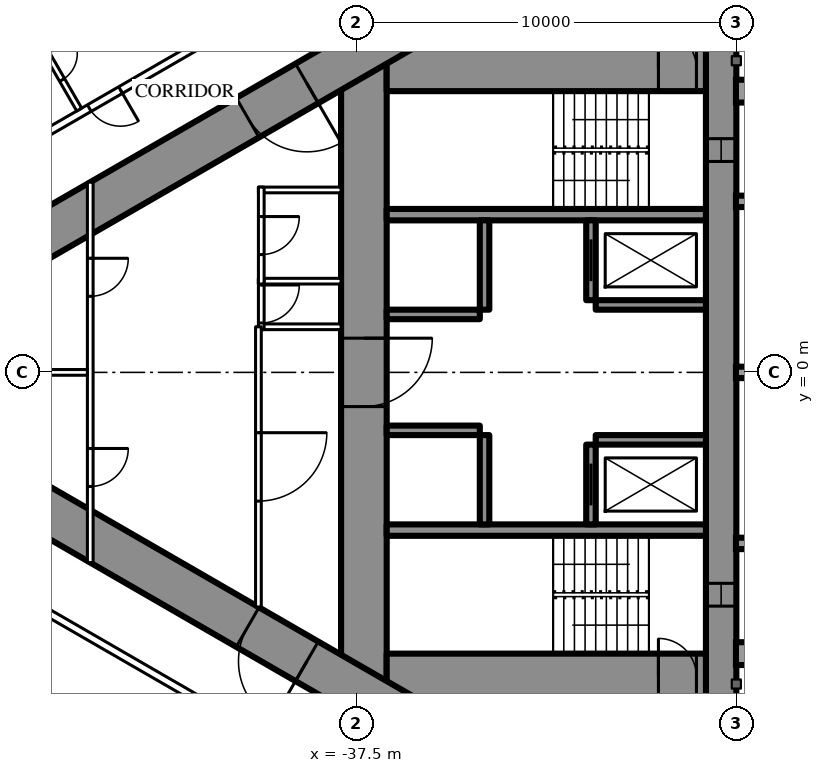
"""IFC4 building model, lengths in metres.
Left out: names, types, materials, properties, quantities, classifications, styles, units other than length and angle.
Written with IfcOpenShell. Run it as: python <this file> out.ifc"""

import sys

from ifc_helpers import new_model, si_unit, direction, frame, frame_2d, origin, place, context, subcontext, project, spatial, rectangle, extrude, element, fill, save


model = new_model("IFC4")
c1 = context("Model", 3, precision=1e-05, world=origin(), true_north=direction((0.0, 1.0)))
c2 = subcontext(c1, "Body", "Model", "MODEL_VIEW")
j1 = project(units=[si_unit("LENGTHUNIT", "METRE"), si_unit("PLANEANGLEUNIT", "RADIAN")], contexts=[c1])
p1 = place(None, origin())
s1 = spatial("IfcSite", under=j1, at=p1, CompositionType="ELEMENT")
p2 = place(p1, origin())
s2 = spatial("IfcBuilding", under=s1, at=p2, CompositionType="ELEMENT")
p3 = place(p2, frame((0.0, 0.0, 125.6)))
s3 = spatial("IfcBuildingStorey", under=s2, at=p3, CompositionType="ELEMENT", Elevation=125.6)
p4 = place(p3, frame((-27.9, 8.6, 0.0), z_axis=(0.0, 0.0, 1.0), x_axis=(0.0, -1.0, 0.0)))
e1 = element("IfcWall", 1, at=p4, inside=s3, PredefinedType="SHEAR", context=c2, shape_type="SweptSolid", body=[
    extrude(rectangle(XDim=17.2, YDim=0.8, at=frame_2d((8.6, 0.0))), origin(), (0.0, 0.0, 1.0), 3.5),
])
p5 = place(p4, frame((2.45, 0.0, 0.6)))
e2 = element("IfcOpeningElement", 2, at=p5, cuts=e1, PredefinedType="OPENING", context=c2, shape_type="SweptSolid", body=[
    extrude(rectangle(XDim=0.6, YDim=2.1, at=frame_2d((0.3, 1.05))), frame((0.0, 0.41, 0.0), z_axis=(0.0, -1.0, 0.0), x_axis=(1.0, 0.0, 0.0)), (0.0, 0.0, 1.0), 0.82),
])
p6 = place(p4, frame((14.15, 0.0, 0.6)))
e3 = element("IfcOpeningElement", 3, at=p6, cuts=e1, PredefinedType="OPENING", context=c2, shape_type="SweptSolid", body=[
    extrude(rectangle(XDim=0.6, YDim=2.1, at=frame_2d((0.3, 1.05))), frame((0.0, 0.41, 0.0), z_axis=(0.0, -1.0, 0.0), x_axis=(1.0, 0.0, 0.0)), (0.0, 0.0, 1.0), 0.82),
])
p7 = place(p3, frame((-37.3, 8.6, 0.0), z_axis=(0.0, 0.0, 1.0), x_axis=(0.0, -1.0, 0.0)))
e4 = element("IfcWall", 4, at=p7, inside=s3, PredefinedType="SHEAR", context=c2, shape_type="SweptSolid", body=[
    extrude(rectangle(XDim=17.2, YDim=1.2, at=frame_2d((8.6, 0.0))), origin(), (0.0, 0.0, 1.0), 3.5),
])
p8 = place(p7, frame((7.7, 0.0, 0.0)))
e5 = element("IfcOpeningElement", 5, at=p8, cuts=e4, PredefinedType="OPENING", context=c2, shape_type="SweptSolid", body=[
    extrude(rectangle(XDim=1.8, YDim=2.2, at=frame_2d((0.9, 1.1))), frame((0.0, 0.61, 0.0), z_axis=(0.0, -1.0, 0.0), x_axis=(1.0, 0.0, 0.0)), (0.0, 0.0, 1.0), 1.22),
])
p9 = place(p3, frame((-28.3, 8.0, 0.0), z_axis=(0.0, 0.0, 1.0), x_axis=(-1.0, 0.0, 0.0)))
e6 = element("IfcWall", 6, at=p9, inside=s3, PredefinedType="SHEAR", context=c2, shape_type="SweptSolid", body=[
    extrude(rectangle(XDim=8.4, YDim=1.2, at=frame_2d((4.2, 0.0))), origin(), (0.0, 0.0, 1.0), 3.5),
])
p10 = place(p9, frame((0.25, 0.0, 0.0)))
e7 = element("IfcOpeningElement", 7, at=p10, cuts=e6, PredefinedType="OPENING", context=c2, shape_type="SweptSolid", body=[
    extrude(rectangle(XDim=1.0, YDim=2.2, at=frame_2d((0.5, 1.1))), frame((0.0, 0.61, 0.0), z_axis=(0.0, -1.0, 0.0), x_axis=(1.0, 0.0, 0.0)), (0.0, 0.0, 1.0), 1.22),
])
p11 = place(p3, frame((-28.3, -8.0, 0.0), z_axis=(0.0, 0.0, 1.0), x_axis=(-1.0, 0.0, 0.0)))
e8 = element("IfcWall", 8, at=p11, inside=s3, PredefinedType="SHEAR", context=c2, shape_type="SweptSolid", body=[
    extrude(rectangle(XDim=8.4, YDim=1.2, at=frame_2d((4.2, 0.0))), origin(), (0.0, 0.0, 1.0), 3.5),
])
p12 = place(p11, frame((0.25, 0.0, 0.0)))
e9 = element("IfcOpeningElement", 9, at=p12, cuts=e8, PredefinedType="OPENING", context=c2, shape_type="SweptSolid", body=[
    extrude(rectangle(XDim=1.0, YDim=2.2, at=frame_2d((0.5, 1.1))), frame((0.0, 0.61, 0.0), z_axis=(0.0, -1.0, 0.0), x_axis=(1.0, 0.0, 0.0)), (0.0, 0.0, 1.0), 1.22),
])
for number, where, z_axis, x_axis in (
    (10, (-28.3, 4.15, 0.0), (0.0, 0.0, 1.0), (-1.0, 0.0, 0.0)),
    (11, (-28.3, -4.15, 0.0), (0.0, 0.0, 1.0), (-1.0, 0.0, 0.0)),
):
    element("IfcWall", number, at=place(p3, frame(where, z_axis=z_axis, x_axis=x_axis)), inside=s3, PredefinedType="SHEAR", context=c2, shape_type="SweptSolid", body=[
        extrude(rectangle(XDim=8.4, YDim=0.3, at=frame_2d((4.2, 0.0))), origin(), (0.0, 0.0, 1.0), 3.5),
    ])
p13 = place(p3, frame((-31.325, 4.0, 0.0), z_axis=(0.0, 0.0, 1.0), x_axis=(0.0, -1.0, 0.0)))
e12 = element("IfcWall", 12, at=p13, inside=s3, PredefinedType="SHEAR", context=c2, shape_type="SweptSolid", body=[
    extrude(rectangle(XDim=2.1, YDim=0.25, at=frame_2d((1.05, 0.0))), origin(), (0.0, 0.0, 1.0), 3.5),
])
p14 = place(p13, frame((0.5, 0.0, 0.0)))
e13 = element("IfcOpeningElement", 13, at=p14, cuts=e12, PredefinedType="OPENING", context=c2, shape_type="SweptSolid", body=[
    extrude(rectangle(XDim=1.1, YDim=2.2, at=frame_2d((0.55, 1.1))), frame((0.0, 0.135, 0.0), z_axis=(0.0, -1.0, 0.0), x_axis=(1.0, 0.0, 0.0)), (0.0, 0.0, 1.0), 0.27),
])
p15 = place(p3, frame((-34.125, 4.0, 0.0), z_axis=(0.0, 0.0, 1.0), x_axis=(0.0, -1.0, 0.0)))
e14 = element("IfcWall", 14, at=p15, inside=s3, PredefinedType="SHEAR", context=c2, shape_type="SweptSolid", body=[
    extrude(rectangle(XDim=2.35, YDim=0.25, at=frame_2d((1.175, 0.0))), origin(), (0.0, 0.0, 1.0), 3.5),
])
p16 = place(p3, frame((-28.3, 1.775, 0.0), z_axis=(0.0, 0.0, 1.0), x_axis=(-1.0, 0.0, 0.0)))
e15 = element("IfcWall", 15, at=p16, inside=s3, PredefinedType="SHEAR", context=c2, shape_type="SweptSolid", body=[
    extrude(rectangle(XDim=2.9, YDim=0.25, at=frame_2d((1.45, 0.0))), origin(), (0.0, 0.0, 1.0), 3.5),
])
p17 = place(p3, frame((-34.25, 1.525, 0.0), z_axis=(0.0, 0.0, 1.0), x_axis=(-1.0, 0.0, 0.0)))
e16 = element("IfcWall", 16, at=p17, inside=s3, PredefinedType="SHEAR", context=c2, shape_type="SweptSolid", body=[
    extrude(rectangle(XDim=2.45, YDim=0.25, at=frame_2d((1.225, 0.0))), origin(), (0.0, 0.0, 1.0), 3.5),
])
p18 = place(p3, frame((-31.325, -1.9, 0.0), z_axis=(0.0, 0.0, 1.0), x_axis=(0.0, -1.0, 0.0)))
e17 = element("IfcWall", 17, at=p18, inside=s3, PredefinedType="SHEAR", context=c2, shape_type="SweptSolid", body=[
    extrude(rectangle(XDim=2.1, YDim=0.25, at=frame_2d((1.05, 0.0))), origin(), (0.0, 0.0, 1.0), 3.5),
])
p19 = place(p18, frame((0.5, 0.0, 0.0)))
e18 = element("IfcOpeningElement", 18, at=p19, cuts=e17, PredefinedType="OPENING", context=c2, shape_type="SweptSolid", body=[
    extrude(rectangle(XDim=1.1, YDim=2.2, at=frame_2d((0.55, 1.1))), frame((0.0, 0.135, 0.0), z_axis=(0.0, -1.0, 0.0), x_axis=(1.0, 0.0, 0.0)), (0.0, 0.0, 1.0), 0.27),
])
p20 = place(p3, frame((-34.125, -1.65, 0.0), z_axis=(0.0, 0.0, 1.0), x_axis=(0.0, -1.0, 0.0)))
e19 = element("IfcWall", 19, at=p20, inside=s3, PredefinedType="SHEAR", context=c2, shape_type="SweptSolid", body=[
    extrude(rectangle(XDim=2.35, YDim=0.25, at=frame_2d((1.175, 0.0))), origin(), (0.0, 0.0, 1.0), 3.5),
])
p21 = place(p3, frame((-28.3, -1.775, 0.0), z_axis=(0.0, 0.0, 1.0), x_axis=(-1.0, 0.0, 0.0)))
e20 = element("IfcWall", 20, at=p21, inside=s3, PredefinedType="SHEAR", context=c2, shape_type="SweptSolid", body=[
    extrude(rectangle(XDim=2.9, YDim=0.25, at=frame_2d((1.45, 0.0))), origin(), (0.0, 0.0, 1.0), 3.5),
])
p22 = place(p3, frame((-34.25, -1.525, 0.0), z_axis=(0.0, 0.0, 1.0), x_axis=(-1.0, 0.0, 0.0)))
e21 = element("IfcWall", 21, at=p22, inside=s3, PredefinedType="SHEAR", context=c2, shape_type="SweptSolid", body=[
    extrude(rectangle(XDim=2.45, YDim=0.25, at=frame_2d((1.225, 0.0))), origin(), (0.0, 0.0, 1.0), 3.5),
])
p23 = place(p3, frame((-27.2, 14.3, 0.0), z_axis=(0.0, 0.0, 1.0), x_axis=(-0.866026593062, -0.499997940104, 0.0)))
e22 = element("IfcWall", 22, at=p23, inside=s3, PredefinedType="SHEAR", context=c2, shape_type="SweptSolid", body=[
    extrude(rectangle(XDim=28.946, YDim=1.2, at=frame_2d((14.473, 0.0))), origin(), (0.0, 0.0, 1.0), 3.5),
])
p24 = place(p23, frame((4.6, 0.0, 0.0)))
e23 = element("IfcOpeningElement", 23, at=p24, cuts=e22, PredefinedType="OPENING", context=c2, shape_type="SweptSolid", body=[
    extrude(rectangle(XDim=1.0, YDim=2.2, at=frame_2d((0.5, 1.1))), frame((0.0, 0.61, 0.0), z_axis=(0.0, -1.0, 0.0), x_axis=(1.0, 0.0, 0.0)), (0.0, 0.0, 1.0), 1.22),
])
p25 = place(p23, frame((13.395, 0.0, 0.0)))
e24 = element("IfcOpeningElement", 24, at=p25, cuts=e22, PredefinedType="OPENING", context=c2, shape_type="SweptSolid", body=[
    extrude(rectangle(XDim=1.8, YDim=2.2, at=frame_2d((0.9, 1.1))), frame((0.0, 0.61, 0.0), z_axis=(0.0, -1.0, 0.0), x_axis=(1.0, 0.0, 0.0)), (0.0, 0.0, 1.0), 1.22),
])
p26 = place(p3, frame((-27.2, -14.3, 0.0), z_axis=(0.0, 0.0, 1.0), x_axis=(-0.866024021859, 0.500002393557, 0.0)))
e25 = element("IfcWall", 25, at=p26, inside=s3, PredefinedType="SHEAR", context=c2, shape_type="SweptSolid", body=[
    extrude(rectangle(XDim=27.907, YDim=1.2, at=frame_2d((13.954, 0.0))), origin(), (0.0, 0.0, 1.0), 3.5),
])
p27 = place(p26, frame((4.6, 0.0, 0.0)))
e26 = element("IfcOpeningElement", 26, at=p27, cuts=e25, PredefinedType="OPENING", context=c2, shape_type="SweptSolid", body=[
    extrude(rectangle(XDim=1.0, YDim=2.2, at=frame_2d((0.5, 1.1))), frame((0.0, 0.61, 0.0), z_axis=(0.0, -1.0, 0.0), x_axis=(1.0, 0.0, 0.0)), (0.0, 0.0, 1.0), 1.22),
])
p28 = place(p26, frame((13.395, 0.0, 0.0)))
e27 = element("IfcOpeningElement", 27, at=p28, cuts=e25, PredefinedType="OPENING", context=c2, shape_type="SweptSolid", body=[
    extrude(rectangle(XDim=1.8, YDim=2.2, at=frame_2d((0.9, 1.1))), frame((0.0, 0.61, 0.0), z_axis=(0.0, -1.0, 0.0), x_axis=(1.0, 0.0, 0.0)), (0.0, 0.0, 1.0), 1.22),
])
p29 = place(p3, frame((-36.92, -11.344, 0.0), z_axis=(0.0, 0.0, 1.0), x_axis=(-0.866028313256, 0.499994960614, 0.0)))
e28 = element("IfcWall", 28, at=p29, inside=s3, PredefinedType="PARTITIONING", context=c2, shape_type="SweptSolid", body=[
    extrude(rectangle(XDim=22.568, YDim=0.2, at=frame_2d((11.284, 0.0))), origin(), (0.0, 0.0, 1.0), 3.25),
])
p30 = place(p29, frame((12.131, 0.0, 0.0)))
e29 = element("IfcOpeningElement", 29, at=p30, cuts=e28, PredefinedType="OPENING", context=c2, shape_type="SweptSolid", body=[
    extrude(rectangle(XDim=0.95, YDim=2.2, at=frame_2d((0.475, 1.1))), frame((0.0, 0.11, 0.0), z_axis=(0.0, -1.0, 0.0), x_axis=(1.0, 0.0, 0.0)), (0.0, 0.0, 1.0), 0.22),
])
p31 = place(p29, frame((3.35, 0.0, 0.0)))
e30 = element("IfcOpeningElement", 30, at=p31, cuts=e28, PredefinedType="OPENING", context=c2, shape_type="SweptSolid", body=[
    extrude(rectangle(XDim=1.0, YDim=2.2, at=frame_2d((0.5, 1.1))), frame((0.0, 0.11, 0.0), z_axis=(0.0, -1.0, 0.0), x_axis=(1.0, 0.0, 0.0)), (0.0, 0.0, 1.0), 0.22),
])
p32 = place(p3, frame((-37.7, 10.894, 0.0), z_axis=(0.0, 0.0, 1.0), x_axis=(-0.866027551079, -0.499996280759, 0.0)))
e31 = element("IfcWall", 31, at=p32, inside=s3, PredefinedType="PARTITIONING", context=c2, shape_type="SweptSolid", body=[
    extrude(rectangle(XDim=10.831, YDim=0.2, at=frame_2d((5.415, 0.0))), origin(), (0.0, 0.0, 1.0), 3.25),
])
p33 = place(p32, frame((6.93, 0.0, 0.0)))
e32 = element("IfcOpeningElement", 32, at=p33, cuts=e31, PredefinedType="OPENING", context=c2, shape_type="SweptSolid", body=[
    extrude(rectangle(XDim=0.95, YDim=2.2, at=frame_2d((0.475, 1.1))), frame((0.0, 0.11, 0.0), z_axis=(0.0, -1.0, 0.0), x_axis=(1.0, 0.0, 0.0)), (0.0, 0.0, 1.0), 0.22),
])
p34 = place(p3, frame((-44.791, 6.915, 0.0), z_axis=(0.0, 0.0, 1.0), x_axis=(-0.500047596559, 0.865997922154, 0.0)))
e33 = element("IfcWall", 33, at=p34, inside=s3, PredefinedType="PARTITIONING", context=c2, shape_type="SweptSolid", body=[
    extrude(rectangle(XDim=2.6, YDim=0.15, at=frame_2d((1.3, 0.0))), origin(), (0.0, 0.0, 1.0), 3.25),
])
p35 = place(p34, frame((0.9, 0.0, 0.0)))
e34 = element("IfcOpeningElement", 34, at=p35, cuts=e33, PredefinedType="OPENING", context=c2, shape_type="SweptSolid", body=[
    extrude(rectangle(XDim=0.8, YDim=2.2, at=frame_2d((0.4, 1.1))), frame((0.0, 0.085, 0.0), z_axis=(0.0, -1.0, 0.0), x_axis=(1.0, 0.0, 0.0)), (0.0, 0.0, 1.0), 0.17),
])
for number, where, z_axis, x_axis in (
    (35, (-37.9, 1.2, 0.0), (0.0, 0.0, 1.0), (-1.0, 0.0, 0.0)),
    (36, (-37.9, 2.4, 0.0), (0.0, 0.0, 1.0), (-1.0, 0.0, 0.0)),
    (37, (-37.9, 4.8, 0.0), (0.0, 0.0, 1.0), (-1.0, 0.0, 0.0)),
):
    element("IfcWall", number, at=place(p3, frame(where, z_axis=z_axis, x_axis=x_axis)), inside=s3, PredefinedType="PARTITIONING", context=c2, shape_type="SweptSolid", body=[
        extrude(rectangle(XDim=2.175, YDim=0.15, at=frame_2d((1.087, 0.0))), origin(), (0.0, 0.0, 1.0), 3.25),
    ])
p36 = place(p3, frame((-40.0, 2.475, 0.0), z_axis=(0.0, 0.0, 1.0), x_axis=(0.0, -1.0, 0.0)))
e38 = element("IfcWall", 38, at=p36, inside=s3, PredefinedType="PARTITIONING", context=c2, shape_type="SweptSolid", body=[
    extrude(rectangle(XDim=1.35, YDim=0.15, at=frame_2d((0.675, 0.0))), origin(), (0.0, 0.0, 1.0), 3.25),
])
p37 = place(p36, frame((0.175, 0.0, 0.0)))
e39 = element("IfcOpeningElement", 39, at=p37, cuts=e38, PredefinedType="OPENING", context=c2, shape_type="SweptSolid", body=[
    extrude(rectangle(XDim=1.0, YDim=2.2, at=frame_2d((0.5, 1.1))), frame((0.0, 0.085, 0.0), z_axis=(0.0, -1.0, 0.0), x_axis=(1.0, 0.0, 0.0)), (0.0, 0.0, 1.0), 0.17),
])
p38 = place(p3, frame((-40.0, 4.875, 0.0), z_axis=(0.0, 0.0, 1.0), x_axis=(0.0, -1.0, 0.0)))
e40 = element("IfcWall", 40, at=p38, inside=s3, PredefinedType="PARTITIONING", context=c2, shape_type="SweptSolid", body=[
    extrude(rectangle(XDim=2.55, YDim=0.15, at=frame_2d((1.275, 0.0))), origin(), (0.0, 0.0, 1.0), 3.25),
])
p39 = place(p38, frame((0.775, 0.0, 0.0)))
e41 = element("IfcOpeningElement", 41, at=p39, cuts=e40, PredefinedType="OPENING", context=c2, shape_type="SweptSolid", body=[
    extrude(rectangle(XDim=1.0, YDim=2.2, at=frame_2d((0.5, 1.1))), frame((0.0, 0.085, 0.0), z_axis=(0.0, -1.0, 0.0), x_axis=(1.0, 0.0, 0.0)), (0.0, 0.0, 1.0), 0.17),
])
p40 = place(p3, frame((-40.075, 1.2, 0.0), z_axis=(0.0, 0.0, 1.0), x_axis=(0.0, -1.0, 0.0)))
e42 = element("IfcWall", 42, at=p40, inside=s3, PredefinedType="PARTITIONING", context=c2, shape_type="SweptSolid", body=[
    extrude(rectangle(XDim=7.374, YDim=0.15, at=frame_2d((3.687, 0.0))), origin(), (0.0, 0.0, 1.0), 3.25),
])
p41 = place(p40, frame((2.787, 0.0, 0.0)))
e43 = element("IfcOpeningElement", 43, at=p41, cuts=e42, PredefinedType="OPENING", context=c2, shape_type="SweptSolid", body=[
    extrude(rectangle(XDim=1.8, YDim=2.2, at=frame_2d((0.9, 1.1))), frame((0.0, 0.085, 0.0), z_axis=(0.0, -1.0, 0.0), x_axis=(1.0, 0.0, 0.0)), (0.0, 0.0, 1.0), 0.17),
])
p42 = place(p3, frame((-44.5, 5.005, 0.0), z_axis=(0.0, 0.0, 1.0), x_axis=(0.0, -1.0, 0.0)))
e44 = element("IfcWall", 44, at=p42, inside=s3, PredefinedType="PARTITIONING", context=c2, shape_type="SweptSolid", body=[
    extrude(rectangle(XDim=10.009, YDim=0.15, at=frame_2d((5.005, 0.0))), origin(), (0.0, 0.0, 1.0), 2.45),
])
p43 = place(p42, frame((2.002, 0.0, 0.0)))
e45 = element("IfcOpeningElement", 45, at=p43, cuts=e44, PredefinedType="OPENING", context=c2, shape_type="SweptSolid", body=[
    extrude(rectangle(XDim=1.0, YDim=2.2, at=frame_2d((0.5, 1.1))), frame((0.0, 0.085, 0.0), z_axis=(0.0, -1.0, 0.0), x_axis=(1.0, 0.0, 0.0)), (0.0, 0.0, 1.0), 0.17),
])
p44 = place(p42, frame((7.007, 0.0, 0.0)))
e46 = element("IfcOpeningElement", 46, at=p44, cuts=e44, PredefinedType="OPENING", context=c2, shape_type="SweptSolid", body=[
    extrude(rectangle(XDim=1.0, YDim=2.2, at=frame_2d((0.5, 1.1))), frame((0.0, 0.085, 0.0), z_axis=(0.0, -1.0, 0.0), x_axis=(1.0, 0.0, 0.0)), (0.0, 0.0, 1.0), 0.17),
])
p45 = place(p3, frame((-44.575, 0.0, 0.0), z_axis=(0.0, 0.0, 1.0), x_axis=(-1.0, 0.0, 0.0)))
e47 = element("IfcWall", 47, at=p45, inside=s3, PredefinedType="PARTITIONING", context=c2, shape_type="SweptSolid", body=[
    extrude(rectangle(XDim=8.593, YDim=0.15, at=frame_2d((4.297, 0.0))), origin(), (0.0, 0.0, 1.0), 2.2),
])
p46 = place(p35, origin())
e48 = element("IfcDoor", 48, at=p46, inside=s3, OperationType="SINGLE_SWING_RIGHT", PredefinedType="DOOR", context=c2, shape_type="SweptSolid", body=[
    extrude(rectangle(XDim=0.8, YDim=2.2, at=frame_2d((0.4, 1.1))), frame((0.0, 0.025, 0.0), z_axis=(0.0, -1.0, 0.0), x_axis=(1.0, 0.0, 0.0)), (0.0, 0.0, 1.0), 0.05),
])
fill(e34, e48)
p47 = place(p33, origin())
e49 = element("IfcDoor", 49, at=p47, inside=s3, OperationType="SINGLE_SWING_LEFT", PredefinedType="DOOR", context=c2, shape_type="SweptSolid", body=[
    extrude(rectangle(XDim=0.95, YDim=2.2, at=frame_2d((0.475, 1.1))), frame((0.0, 0.025, 0.0), z_axis=(0.0, -1.0, 0.0), x_axis=(1.0, 0.0, 0.0)), (0.0, 0.0, 1.0), 0.05),
])
fill(e32, e49)
p48 = place(p37, origin())
e50 = element("IfcDoor", 50, at=p48, inside=s3, OperationType="SINGLE_SWING_LEFT", PredefinedType="DOOR", context=c2, shape_type="SweptSolid", body=[
    extrude(rectangle(XDim=1.0, YDim=2.2, at=frame_2d((0.5, 1.1))), frame((0.0, 0.025, 0.0), z_axis=(0.0, -1.0, 0.0), x_axis=(1.0, 0.0, 0.0)), (0.0, 0.0, 1.0), 0.05),
])
fill(e39, e50)
p49 = place(p39, origin())
e51 = element("IfcDoor", 51, at=p49, inside=s3, OperationType="SINGLE_SWING_LEFT", PredefinedType="DOOR", context=c2, shape_type="SweptSolid", body=[
    extrude(rectangle(XDim=1.0, YDim=2.2, at=frame_2d((0.5, 1.1))), frame((0.0, 0.025, 0.0), z_axis=(0.0, -1.0, 0.0), x_axis=(1.0, 0.0, 0.0)), (0.0, 0.0, 1.0), 0.05),
])
fill(e41, e51)
p50 = place(p41, origin())
e52 = element("IfcDoor", 52, at=p50, inside=s3, OperationType="DOUBLE_DOOR_SINGLE_SWING", PredefinedType="DOOR", context=c2, shape_type="SweptSolid", body=[
    extrude(rectangle(XDim=1.8, YDim=2.2, at=frame_2d((0.9, 1.1))), frame((0.0, 0.025, 0.0), z_axis=(0.0, -1.0, 0.0), x_axis=(1.0, 0.0, 0.0)), (0.0, 0.0, 1.0), 0.05),
])
fill(e43, e52)
p51 = place(p43, origin())
e53 = element("IfcDoor", 53, at=p51, inside=s3, OperationType="SINGLE_SWING_LEFT", PredefinedType="DOOR", context=c2, shape_type="SweptSolid", body=[
    extrude(rectangle(XDim=1.0, YDim=2.2, at=frame_2d((0.5, 1.1))), frame((0.0, 0.025, 0.0), z_axis=(0.0, -1.0, 0.0), x_axis=(1.0, 0.0, 0.0)), (0.0, 0.0, 1.0), 0.05),
])
fill(e45, e53)
p52 = place(p44, origin())
e54 = element("IfcDoor", 54, at=p52, inside=s3, OperationType="SINGLE_SWING_LEFT", PredefinedType="DOOR", context=c2, shape_type="SweptSolid", body=[
    extrude(rectangle(XDim=1.0, YDim=2.2, at=frame_2d((0.5, 1.1))), frame((0.0, 0.025, 0.0), z_axis=(0.0, -1.0, 0.0), x_axis=(1.0, 0.0, 0.0)), (0.0, 0.0, 1.0), 0.05),
])
fill(e46, e54)
p53 = place(p25, origin())
e55 = element("IfcDoor", 55, at=p53, inside=s3, OperationType="DOUBLE_DOOR_SINGLE_SWING", PredefinedType="DOOR", context=c2, shape_type="SweptSolid", body=[
    extrude(rectangle(XDim=1.8, YDim=2.2, at=frame_2d((0.9, 1.1))), frame((0.0, 0.025, 0.0), z_axis=(0.0, -1.0, 0.0), x_axis=(1.0, 0.0, 0.0)), (0.0, 0.0, 1.0), 0.05),
])
fill(e24, e55)
p54 = place(p28, origin())
e56 = element("IfcDoor", 56, at=p54, inside=s3, OperationType="DOUBLE_DOOR_SINGLE_SWING", PredefinedType="DOOR", context=c2, shape_type="SweptSolid", body=[
    extrude(rectangle(XDim=1.8, YDim=2.2, at=frame_2d((0.9, 1.1))), frame((0.0, 0.025, 0.0), z_axis=(0.0, -1.0, 0.0), x_axis=(1.0, 0.0, 0.0)), (0.0, 0.0, 1.0), 0.05),
])
fill(e27, e56)
p55 = place(p8, origin())
e57 = element("IfcDoor", 57, at=p55, inside=s3, OperationType="DOUBLE_DOOR_SINGLE_SWING", PredefinedType="DOOR", context=c2, shape_type="SweptSolid", body=[
    extrude(rectangle(XDim=1.8, YDim=2.2, at=frame_2d((0.9, 1.1))), frame((0.0, 0.025, 0.0), z_axis=(0.0, -1.0, 0.0), x_axis=(1.0, 0.0, 0.0)), (0.0, 0.0, 1.0), 0.05),
])
fill(e5, e57)
p56 = place(p10, origin())
e58 = element("IfcDoor", 58, at=p56, inside=s3, OperationType="SINGLE_SWING_RIGHT", PredefinedType="DOOR", context=c2, shape_type="SweptSolid", body=[
    extrude(rectangle(XDim=1.0, YDim=2.2, at=frame_2d((0.5, 1.1))), frame((0.0, 0.025, 0.0), z_axis=(0.0, -1.0, 0.0), x_axis=(1.0, 0.0, 0.0)), (0.0, 0.0, 1.0), 0.05),
])
fill(e7, e58)
p57 = place(p12, origin())
e59 = element("IfcDoor", 59, at=p57, inside=s3, OperationType="SINGLE_SWING_RIGHT", PredefinedType="DOOR", context=c2, shape_type="SweptSolid", body=[
    extrude(rectangle(XDim=1.0, YDim=2.2, at=frame_2d((0.5, 1.1))), frame((0.0, 0.025, 0.0), z_axis=(0.0, -1.0, 0.0), x_axis=(1.0, 0.0, 0.0)), (0.0, 0.0, 1.0), 0.05),
])
fill(e9, e59)
p58 = place(p14, origin())
e60 = element("IfcDoor", 60, at=p58, inside=s3, OperationType="SLIDING_TO_LEFT", PredefinedType="USERDEFINED", context=c2, shape_type="SweptSolid", body=[
    extrude(rectangle(XDim=1.1, YDim=2.2, at=frame_2d((0.55, 1.1))), frame((0.0, 0.025, 0.0), z_axis=(0.0, -1.0, 0.0), x_axis=(1.0, 0.0, 0.0)), (0.0, 0.0, 1.0), 0.05),
])
fill(e13, e60)
p59 = place(p19, origin())
e61 = element("IfcDoor", 61, at=p59, inside=s3, OperationType="SLIDING_TO_LEFT", PredefinedType="USERDEFINED", context=c2, shape_type="SweptSolid", body=[
    extrude(rectangle(XDim=1.1, YDim=2.2, at=frame_2d((0.55, 1.1))), frame((0.0, 0.025, 0.0), z_axis=(0.0, -1.0, 0.0), x_axis=(1.0, 0.0, 0.0)), (0.0, 0.0, 1.0), 0.05),
])
fill(e18, e61)
p60 = place(p5, origin())
e62 = element("IfcWindow", 62, at=p60, inside=s3, PartitioningType="SINGLE_PANEL", PredefinedType="WINDOW", context=c2, shape_type="SweptSolid", body=[
    extrude(rectangle(XDim=0.6, YDim=2.1, at=frame_2d((0.3, 1.05))), frame((0.0, 0.03, 0.0), z_axis=(0.0, -1.0, 0.0), x_axis=(1.0, 0.0, 0.0)), (0.0, 0.0, 1.0), 0.06),
])
fill(e2, e62)
p61 = place(p6, origin())
e63 = element("IfcWindow", 63, at=p61, inside=s3, PartitioningType="SINGLE_PANEL", PredefinedType="WINDOW", context=c2, shape_type="SweptSolid", body=[
    extrude(rectangle(XDim=0.6, YDim=2.1, at=frame_2d((0.3, 1.05))), frame((0.0, 0.03, 0.0), z_axis=(0.0, -1.0, 0.0), x_axis=(1.0, 0.0, 0.0)), (0.0, 0.0, 1.0), 0.06),
])
fill(e3, e63)
save(model, sys.argv[1])
